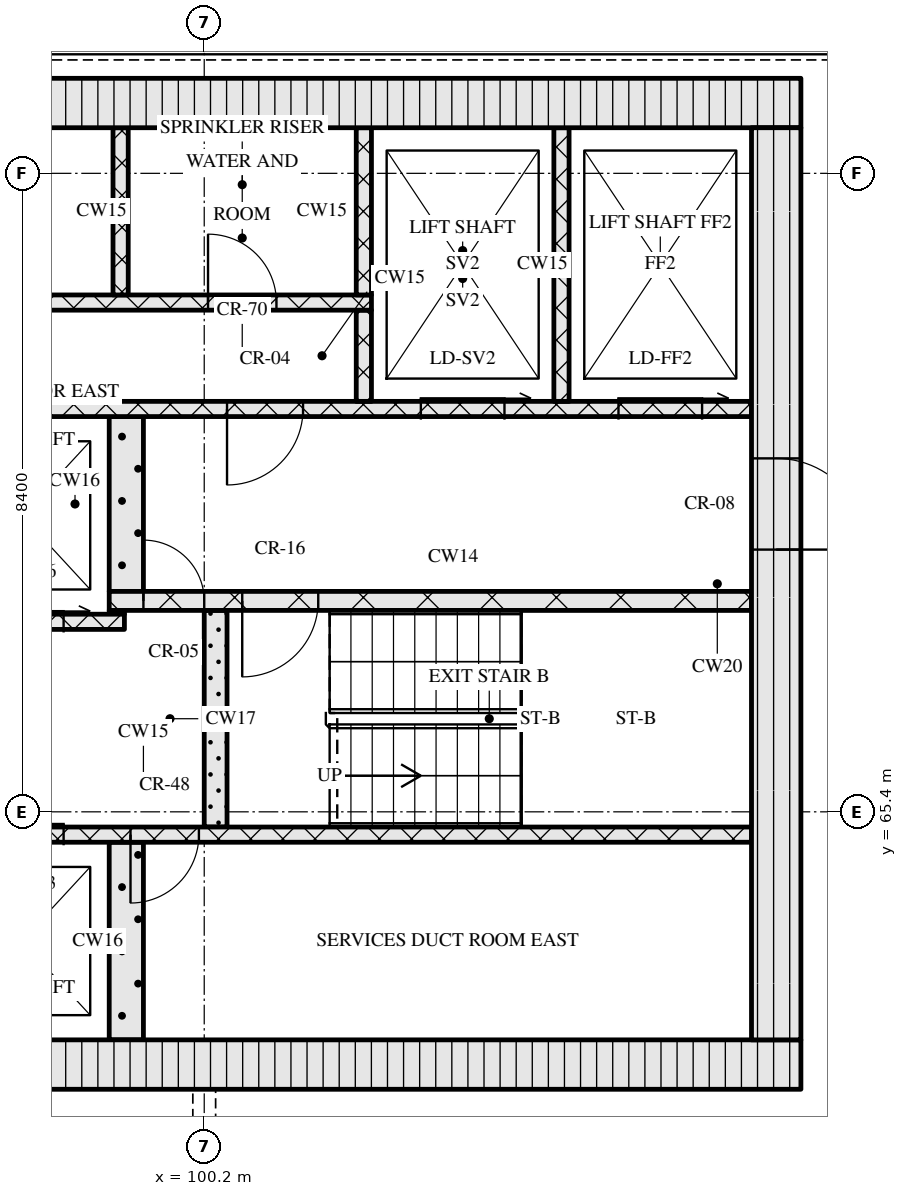
"""IFC4 building model, lengths in metres.
Left out: names, types, materials, properties, quantities, classifications, styles, units other than length and angle.
Written with IfcOpenShell. Run it as: python <this file> out.ifc"""

import sys

from ifc_helpers import new_model, si_unit, direction, frame, frame_2d, origin, place, context, subcontext, project, spatial, rectangle, extrude, element, fill, save


model = new_model("IFC4")
c1 = context("Model", 3, precision=1e-05, world=origin(), true_north=direction((0.0, 1.0)))
c2 = subcontext(c1, "Body", "Model", "MODEL_VIEW")
j1 = project(units=[si_unit("LENGTHUNIT", "METRE"), si_unit("PLANEANGLEUNIT", "RADIAN")], contexts=[c1])
p1 = place(None, origin())
s1 = spatial("IfcSite", under=j1, at=p1, CompositionType="ELEMENT")
p2 = place(p1, origin())
s2 = spatial("IfcBuilding", under=s1, at=p2, CompositionType="ELEMENT")
p3 = place(p2, frame((0.0, 0.0, 205.5)))
s3 = spatial("IfcBuildingStorey", under=s2, at=p3, CompositionType="ELEMENT", Elevation=205.5)
p4 = place(p3, frame((67.15, 62.075, 0.0), z_axis=(0.0, 0.0, 1.0), x_axis=(1.0, 0.0, 0.0)))
e1 = element("IfcWall", 1, at=p4, inside=s3, PredefinedType="SOLIDWALL", context=c2, shape_type="SweptSolid", body=[
    extrude(rectangle(XDim=40.9, YDim=0.65, at=frame_2d((20.45, 0.0))), origin(), (0.0, 0.0, 1.0), 3.32),
])
p5 = place(p4, frame((20.8, 0.0, 0.0)))
e2 = element("IfcOpeningElement", 2, at=p5, cuts=e1, PredefinedType="OPENING", context=c2, shape_type="SweptSolid", body=[
    extrude(rectangle(XDim=1.8, YDim=2.1, at=frame_2d((0.9, 1.05))), frame((0.0, 0.335, 0.0), z_axis=(0.0, -1.0, 0.0), x_axis=(1.0, 0.0, 0.0)), (0.0, 0.0, 1.0), 0.67),
])
p6 = place(p3, frame((67.15, 74.725, 0.0), z_axis=(0.0, 0.0, 1.0), x_axis=(1.0, 0.0, 0.0)))
e3 = element("IfcWall", 3, at=p6, inside=s3, PredefinedType="SOLIDWALL", context=c2, shape_type="SweptSolid", body=[
    extrude(rectangle(XDim=40.9, YDim=0.65, at=frame_2d((20.45, 0.0))), origin(), (0.0, 0.0, 1.0), 3.32),
])
p7 = place(p3, frame((107.725, 62.4, 0.0), z_axis=(0.0, 0.0, 1.0), x_axis=(0.0, 1.0, 0.0)))
e4 = element("IfcWall", 4, at=p7, inside=s3, PredefinedType="SOLIDWALL", context=c2, shape_type="SweptSolid", body=[
    extrude(rectangle(XDim=12.0, YDim=0.65, at=frame_2d((6.0, 0.0))), origin(), (0.0, 0.0, 1.0), 3.32),
])
p8 = place(p7, frame((6.45, 0.0, 0.0)))
e5 = element("IfcOpeningElement", 5, at=p8, cuts=e4, PredefinedType="OPENING", context=c2, shape_type="SweptSolid", body=[
    extrude(rectangle(XDim=1.2, YDim=2.1, at=frame_2d((0.6, 1.05))), frame((0.0, 0.335, 0.0), z_axis=(0.0, -1.0, 0.0), x_axis=(1.0, 0.0, 0.0)), (0.0, 0.0, 1.0), 0.67),
])
p9 = place(p3, frame((99.175, 62.4, 0.0), z_axis=(0.0, 0.0, 1.0), x_axis=(0.0, 1.0, 0.0)))
e6 = element("IfcWall", 6, at=p9, inside=s3, PredefinedType="SOLIDWALL", context=c2, shape_type="SweptSolid", body=[
    extrude(rectangle(XDim=2.6, YDim=0.45, at=frame_2d((1.3, 0.0))), origin(), (0.0, 0.0, 1.0), 3.32),
])
p10 = place(p3, frame((91.4, 65.1, 0.0), z_axis=(0.0, 0.0, 1.0), x_axis=(1.0, 0.0, 0.0)))
e7 = element("IfcWall", 7, at=p10, inside=s3, PredefinedType="SOLIDWALL", context=c2, shape_type="SweptSolid", body=[
    extrude(rectangle(XDim=16.0, YDim=0.2, at=frame_2d((8.0, 0.0))), origin(), (0.0, 0.0, 1.0), 3.32),
])
p11 = place(p10, frame((0.85, 0.0, 0.0)))
e8 = element("IfcOpeningElement", 8, at=p11, cuts=e7, PredefinedType="OPENING", context=c2, shape_type="SweptSolid", body=[
    extrude(rectangle(XDim=1.1, YDim=2.1, at=frame_2d((0.55, 1.05))), frame((0.0, 0.11, 0.0), z_axis=(0.0, -1.0, 0.0), x_axis=(1.0, 0.0, 0.0)), (0.0, 0.0, 1.0), 0.22),
])
p12 = place(p10, frame((3.35, 0.0, 0.0)))
e9 = element("IfcOpeningElement", 9, at=p12, cuts=e7, PredefinedType="OPENING", context=c2, shape_type="SweptSolid", body=[
    extrude(rectangle(XDim=1.1, YDim=2.1, at=frame_2d((0.55, 1.05))), frame((0.0, 0.11, 0.0), z_axis=(0.0, -1.0, 0.0), x_axis=(1.0, 0.0, 0.0)), (0.0, 0.0, 1.0), 0.22),
])
p13 = place(p10, frame((5.85, 0.0, 0.0)))
e10 = element("IfcOpeningElement", 10, at=p13, cuts=e7, PredefinedType="OPENING", context=c2, shape_type="SweptSolid", body=[
    extrude(rectangle(XDim=1.1, YDim=2.1, at=frame_2d((0.55, 1.05))), frame((0.0, 0.11, 0.0), z_axis=(0.0, -1.0, 0.0), x_axis=(1.0, 0.0, 0.0)), (0.0, 0.0, 1.0), 0.22),
])
p14 = place(p10, frame((7.83, 0.0, 0.0)))
e11 = element("IfcOpeningElement", 11, at=p14, cuts=e7, PredefinedType="OPENING", context=c2, shape_type="SweptSolid", body=[
    extrude(rectangle(XDim=0.9, YDim=2.1, at=frame_2d((0.45, 1.05))), frame((0.0, 0.11, 0.0), z_axis=(0.0, -1.0, 0.0), x_axis=(1.0, 0.0, 0.0)), (0.0, 0.0, 1.0), 0.22),
])
p15 = place(p3, frame((100.35, 65.2, 0.0), z_axis=(0.0, 0.0, 1.0), x_axis=(0.0, 1.0, 0.0)))
e12 = element("IfcWall", 12, at=p15, inside=s3, PredefinedType="SOLIDWALL", context=c2, shape_type="SweptSolid", body=[
    extrude(rectangle(XDim=2.85, YDim=0.3, at=frame_2d((1.425, 0.0))), origin(), (0.0, 0.0, 1.0), 3.32),
])
p16 = place(p3, frame((76.05, 67.9, 0.0), z_axis=(0.0, 0.0, 1.0), x_axis=(1.0, 0.0, 0.0)))
e13 = element("IfcWall", 13, at=p16, inside=s3, PredefinedType="SOLIDWALL", context=c2, shape_type="SweptSolid", body=[
    extrude(rectangle(XDim=23.1, YDim=0.2, at=frame_2d((11.55, 0.0))), origin(), (0.0, 0.0, 1.0), 3.32),
])
p17 = place(p16, frame((1.4, 0.0, 0.0)))
e14 = element("IfcOpeningElement", 14, at=p17, cuts=e13, PredefinedType="OPENING", context=c2, shape_type="SweptSolid", body=[
    extrude(rectangle(XDim=0.9, YDim=2.1, at=frame_2d((0.45, 1.05))), frame((0.0, 0.11, 0.0), z_axis=(0.0, -1.0, 0.0), x_axis=(1.0, 0.0, 0.0)), (0.0, 0.0, 1.0), 0.22),
])
p18 = place(p16, frame((5.11, 0.0, 0.0)))
e15 = element("IfcOpeningElement", 15, at=p18, cuts=e13, PredefinedType="OPENING", context=c2, shape_type="SweptSolid", body=[
    extrude(rectangle(XDim=0.9, YDim=2.1, at=frame_2d((0.45, 1.05))), frame((0.0, 0.11, 0.0), z_axis=(0.0, -1.0, 0.0), x_axis=(1.0, 0.0, 0.0)), (0.0, 0.0, 1.0), 0.22),
])
p19 = place(p16, frame((8.45, 0.0, 0.0)))
e16 = element("IfcOpeningElement", 16, at=p19, cuts=e13, PredefinedType="OPENING", context=c2, shape_type="SweptSolid", body=[
    extrude(rectangle(XDim=0.9, YDim=2.1, at=frame_2d((0.45, 1.05))), frame((0.0, 0.11, 0.0), z_axis=(0.0, -1.0, 0.0), x_axis=(1.0, 0.0, 0.0)), (0.0, 0.0, 1.0), 0.22),
])
p20 = place(p16, frame((10.91, 0.0, 0.0)))
e17 = element("IfcOpeningElement", 17, at=p20, cuts=e13, PredefinedType="OPENING", context=c2, shape_type="SweptSolid", body=[
    extrude(rectangle(XDim=0.9, YDim=2.1, at=frame_2d((0.45, 1.05))), frame((0.0, 0.11, 0.0), z_axis=(0.0, -1.0, 0.0), x_axis=(1.0, 0.0, 0.0)), (0.0, 0.0, 1.0), 0.22),
])
p21 = place(p16, frame((13.55, 0.0, 0.0)))
e18 = element("IfcOpeningElement", 18, at=p21, cuts=e13, PredefinedType="OPENING", context=c2, shape_type="SweptSolid", body=[
    extrude(rectangle(XDim=1.0, YDim=2.1, at=frame_2d((0.5, 1.05))), frame((0.0, 0.11, 0.0), z_axis=(0.0, -1.0, 0.0), x_axis=(1.0, 0.0, 0.0)), (0.0, 0.0, 1.0), 0.22),
])
p22 = place(p16, frame((16.2, 0.0, 0.0)))
e19 = element("IfcOpeningElement", 19, at=p22, cuts=e13, PredefinedType="OPENING", context=c2, shape_type="SweptSolid", body=[
    extrude(rectangle(XDim=1.1, YDim=2.1, at=frame_2d((0.55, 1.05))), frame((0.0, 0.11, 0.0), z_axis=(0.0, -1.0, 0.0), x_axis=(1.0, 0.0, 0.0)), (0.0, 0.0, 1.0), 0.22),
])
p23 = place(p16, frame((18.7, 0.0, 0.0)))
e20 = element("IfcOpeningElement", 20, at=p23, cuts=e13, PredefinedType="OPENING", context=c2, shape_type="SweptSolid", body=[
    extrude(rectangle(XDim=1.1, YDim=2.1, at=frame_2d((0.55, 1.05))), frame((0.0, 0.11, 0.0), z_axis=(0.0, -1.0, 0.0), x_axis=(1.0, 0.0, 0.0)), (0.0, 0.0, 1.0), 0.22),
])
p24 = place(p16, frame((21.2, 0.0, 0.0)))
e21 = element("IfcOpeningElement", 21, at=p24, cuts=e13, PredefinedType="OPENING", context=c2, shape_type="SweptSolid", body=[
    extrude(rectangle(XDim=1.1, YDim=2.1, at=frame_2d((0.55, 1.05))), frame((0.0, 0.11, 0.0), z_axis=(0.0, -1.0, 0.0), x_axis=(1.0, 0.0, 0.0)), (0.0, 0.0, 1.0), 0.22),
])
p25 = place(p3, frame((98.95, 68.025, 0.0), z_axis=(0.0, 0.0, 1.0), x_axis=(1.0, 0.0, 0.0)))
e22 = element("IfcWall", 22, at=p25, inside=s3, PredefinedType="SOLIDWALL", context=c2, shape_type="SweptSolid", body=[
    extrude(rectangle(XDim=0.2, YDim=0.05, at=frame_2d((0.1, 0.0))), origin(), (0.0, 0.0, 1.0), 3.32),
])
p26 = place(p3, frame((98.95, 68.175, 0.0), z_axis=(0.0, 0.0, 1.0), x_axis=(1.0, 0.0, 0.0)))
e23 = element("IfcWall", 23, at=p26, inside=s3, PredefinedType="SOLIDWALL", context=c2, shape_type="SweptSolid", body=[
    extrude(rectangle(XDim=8.45, YDim=0.25, at=frame_2d((4.225, 0.0))), origin(), (0.0, 0.0, 1.0), 3.32),
])
p27 = place(p26, frame((0.45, 0.0, 0.0)))
e24 = element("IfcOpeningElement", 24, at=p27, cuts=e23, PredefinedType="OPENING", context=c2, shape_type="SweptSolid", body=[
    extrude(rectangle(XDim=0.8, YDim=2.1, at=frame_2d((0.4, 1.05))), frame((0.0, 0.135, 0.0), z_axis=(0.0, -1.0, 0.0), x_axis=(1.0, 0.0, 0.0)), (0.0, 0.0, 1.0), 0.27),
])
p28 = place(p26, frame((1.75, 0.0, 0.0)))
e25 = element("IfcOpeningElement", 25, at=p28, cuts=e23, PredefinedType="OPENING", context=c2, shape_type="SweptSolid", body=[
    extrude(rectangle(XDim=1.0, YDim=2.1, at=frame_2d((0.5, 1.05))), frame((0.0, 0.135, 0.0), z_axis=(0.0, -1.0, 0.0), x_axis=(1.0, 0.0, 0.0)), (0.0, 0.0, 1.0), 0.27),
])
p29 = place(p3, frame((99.175, 68.3, 0.0), z_axis=(0.0, 0.0, 1.0), x_axis=(0.0, 1.0, 0.0)))
e26 = element("IfcWall", 26, at=p29, inside=s3, PredefinedType="SOLIDWALL", context=c2, shape_type="SweptSolid", body=[
    extrude(rectangle(XDim=2.3, YDim=0.45, at=frame_2d((1.15, 0.0))), origin(), (0.0, 0.0, 1.0), 3.32),
])
p30 = place(p3, frame((67.8, 70.7, 0.0), z_axis=(0.0, 0.0, 1.0), x_axis=(1.0, 0.0, 0.0)))
e27 = element("IfcWall", 27, at=p30, inside=s3, PredefinedType="SOLIDWALL", context=c2, shape_type="SweptSolid", body=[
    extrude(rectangle(XDim=39.6, YDim=0.2, at=frame_2d((19.8, 0.0))), origin(), (0.0, 0.0, 1.0), 3.32),
])
p31 = place(p30, frame((0.65, 0.0, 0.0)))
e28 = element("IfcOpeningElement", 28, at=p31, cuts=e27, PredefinedType="OPENING", context=c2, shape_type="SweptSolid", body=[
    extrude(rectangle(XDim=1.1, YDim=2.1, at=frame_2d((0.55, 1.05))), frame((0.0, 0.11, 0.0), z_axis=(0.0, -1.0, 0.0), x_axis=(1.0, 0.0, 0.0)), (0.0, 0.0, 1.0), 0.22),
])
p32 = place(p30, frame((3.25, 0.0, 0.0)))
e29 = element("IfcOpeningElement", 29, at=p32, cuts=e27, PredefinedType="OPENING", context=c2, shape_type="SweptSolid", body=[
    extrude(rectangle(XDim=1.1, YDim=2.1, at=frame_2d((0.55, 1.05))), frame((0.0, 0.11, 0.0), z_axis=(0.0, -1.0, 0.0), x_axis=(1.0, 0.0, 0.0)), (0.0, 0.0, 1.0), 0.22),
])
p33 = place(p30, frame((5.9, 0.0, 0.0)))
e30 = element("IfcOpeningElement", 30, at=p33, cuts=e27, PredefinedType="OPENING", context=c2, shape_type="SweptSolid", body=[
    extrude(rectangle(XDim=1.0, YDim=2.1, at=frame_2d((0.5, 1.05))), frame((0.0, 0.11, 0.0), z_axis=(0.0, -1.0, 0.0), x_axis=(1.0, 0.0, 0.0)), (0.0, 0.0, 1.0), 0.22),
])
p34 = place(p30, frame((21.7, 0.0, 0.0)))
e31 = element("IfcOpeningElement", 31, at=p34, cuts=e27, PredefinedType="OPENING", context=c2, shape_type="SweptSolid", body=[
    extrude(rectangle(XDim=1.0, YDim=2.1, at=frame_2d((0.5, 1.05))), frame((0.0, 0.11, 0.0), z_axis=(0.0, -1.0, 0.0), x_axis=(1.0, 0.0, 0.0)), (0.0, 0.0, 1.0), 0.22),
])
p35 = place(p30, frame((32.7, 0.0, 0.0)))
e32 = element("IfcOpeningElement", 32, at=p35, cuts=e27, PredefinedType="OPENING", context=c2, shape_type="SweptSolid", body=[
    extrude(rectangle(XDim=1.0, YDim=2.1, at=frame_2d((0.5, 1.05))), frame((0.0, 0.11, 0.0), z_axis=(0.0, -1.0, 0.0), x_axis=(1.0, 0.0, 0.0)), (0.0, 0.0, 1.0), 0.22),
])
p36 = place(p30, frame((35.25, 0.0, 0.0)))
e33 = element("IfcOpeningElement", 33, at=p36, cuts=e27, PredefinedType="OPENING", context=c2, shape_type="SweptSolid", body=[
    extrude(rectangle(XDim=1.1, YDim=2.1, at=frame_2d((0.55, 1.05))), frame((0.0, 0.11, 0.0), z_axis=(0.0, -1.0, 0.0), x_axis=(1.0, 0.0, 0.0)), (0.0, 0.0, 1.0), 0.22),
])
p37 = place(p30, frame((37.85, 0.0, 0.0)))
e34 = element("IfcOpeningElement", 34, at=p37, cuts=e27, PredefinedType="OPENING", context=c2, shape_type="SweptSolid", body=[
    extrude(rectangle(XDim=1.1, YDim=2.1, at=frame_2d((0.55, 1.05))), frame((0.0, 0.11, 0.0), z_axis=(0.0, -1.0, 0.0), x_axis=(1.0, 0.0, 0.0)), (0.0, 0.0, 1.0), 0.22),
])
p38 = place(p3, frame((102.3, 70.8, 0.0), z_axis=(0.0, 0.0, 1.0), x_axis=(0.0, 1.0, 0.0)))
e35 = element("IfcWall", 35, at=p38, inside=s3, PredefinedType="SOLIDWALL", context=c2, shape_type="SweptSolid", body=[
    extrude(rectangle(XDim=1.2, YDim=0.2, at=frame_2d((0.6, 0.0))), origin(), (0.0, 0.0, 1.0), 3.32),
])
p39 = place(p3, frame((104.9, 70.8, 0.0), z_axis=(0.0, 0.0, 1.0), x_axis=(0.0, 1.0, 0.0)))
e36 = element("IfcWall", 36, at=p39, inside=s3, PredefinedType="SOLIDWALL", context=c2, shape_type="SweptSolid", body=[
    extrude(rectangle(XDim=3.6, YDim=0.2, at=frame_2d((1.8, 0.0))), origin(), (0.0, 0.0, 1.0), 3.32),
])
p40 = place(p3, frame((93.28, 72.1, 0.0), z_axis=(0.0, 0.0, 1.0), x_axis=(1.0, 0.0, 0.0)))
e37 = element("IfcWall", 37, at=p40, inside=s3, PredefinedType="SOLIDWALL", context=c2, shape_type="SweptSolid", body=[
    extrude(rectangle(XDim=9.12, YDim=0.2, at=frame_2d((4.56, 0.0))), origin(), (0.0, 0.0, 1.0), 3.32),
])
p41 = place(p40, frame((0.87, 0.0, 0.0)))
e38 = element("IfcOpeningElement", 38, at=p41, cuts=e37, PredefinedType="OPENING", context=c2, shape_type="SweptSolid", body=[
    extrude(rectangle(XDim=0.9, YDim=2.1, at=frame_2d((0.45, 1.05))), frame((0.0, 0.11, 0.0), z_axis=(0.0, -1.0, 0.0), x_axis=(1.0, 0.0, 0.0)), (0.0, 0.0, 1.0), 0.22),
])
p42 = place(p40, frame((3.73, 0.0, 0.0)))
e39 = element("IfcOpeningElement", 39, at=p42, cuts=e37, PredefinedType="OPENING", context=c2, shape_type="SweptSolid", body=[
    extrude(rectangle(XDim=0.9, YDim=2.1, at=frame_2d((0.45, 1.05))), frame((0.0, 0.11, 0.0), z_axis=(0.0, -1.0, 0.0), x_axis=(1.0, 0.0, 0.0)), (0.0, 0.0, 1.0), 0.22),
])
p43 = place(p40, frame((6.97, 0.0, 0.0)))
e40 = element("IfcOpeningElement", 40, at=p43, cuts=e37, PredefinedType="OPENING", context=c2, shape_type="SweptSolid", body=[
    extrude(rectangle(XDim=0.9, YDim=2.1, at=frame_2d((0.45, 1.05))), frame((0.0, 0.11, 0.0), z_axis=(0.0, -1.0, 0.0), x_axis=(1.0, 0.0, 0.0)), (0.0, 0.0, 1.0), 0.22),
])
for number, where, z_axis, x_axis in (
    (41, (99.1, 72.2, 0.0), (0.0, 0.0, 1.0), (0.0, 1.0, 0.0)),
    (42, (102.3, 72.2, 0.0), (0.0, 0.0, 1.0), (0.0, 1.0, 0.0)),
):
    element("IfcWall", number, at=place(p3, frame(where, z_axis=z_axis, x_axis=x_axis)), inside=s3, PredefinedType="SOLIDWALL", context=c2, shape_type="SweptSolid", body=[
        extrude(rectangle(XDim=2.2, YDim=0.2, at=frame_2d((1.1, 0.0))), origin(), (0.0, 0.0, 1.0), 3.32),
    ])
p44 = place(p13, origin())
e43 = element("IfcDoor", 43, at=p44, inside=s3, OperationType="SLIDING_TO_LEFT", PredefinedType="DOOR", context=c2, shape_type="SweptSolid", body=[
    extrude(rectangle(XDim=1.1, YDim=2.1, at=frame_2d((0.55, 1.05))), frame((0.0, 0.025, 0.0), z_axis=(0.0, -1.0, 0.0), x_axis=(1.0, 0.0, 0.0)), (0.0, 0.0, 1.0), 0.05),
])
fill(e10, e43)
p45 = place(p14, origin())
e44 = element("IfcDoor", 44, at=p45, inside=s3, OperationType="SINGLE_SWING_RIGHT", PredefinedType="DOOR", context=c2, shape_type="SweptSolid", body=[
    extrude(rectangle(XDim=0.9, YDim=2.1, at=frame_2d((0.45, 1.05))), frame((0.0, 0.025, 0.0), z_axis=(0.0, -1.0, 0.0), x_axis=(1.0, 0.0, 0.0)), (0.0, 0.0, 1.0), 0.05),
])
fill(e11, e44)
p46 = place(p24, origin())
e45 = element("IfcDoor", 45, at=p46, inside=s3, OperationType="SLIDING_TO_RIGHT", PredefinedType="DOOR", context=c2, shape_type="SweptSolid", body=[
    extrude(rectangle(XDim=1.1, YDim=2.1, at=frame_2d((0.55, 1.05))), frame((0.0, 0.025, 0.0), z_axis=(0.0, -1.0, 0.0), x_axis=(1.0, 0.0, 0.0)), (0.0, 0.0, 1.0), 0.05),
])
fill(e21, e45)
p47 = place(p27, origin())
e46 = element("IfcDoor", 46, at=p47, inside=s3, OperationType="SINGLE_SWING_LEFT", PredefinedType="DOOR", context=c2, shape_type="SweptSolid", body=[
    extrude(rectangle(XDim=0.8, YDim=2.1, at=frame_2d((0.4, 1.05))), frame((0.0, 0.025, 0.0), z_axis=(0.0, -1.0, 0.0), x_axis=(1.0, 0.0, 0.0)), (0.0, 0.0, 1.0), 0.05),
])
fill(e24, e46)
p48 = place(p28, origin())
e47 = element("IfcDoor", 47, at=p48, inside=s3, OperationType="SINGLE_SWING_RIGHT", PredefinedType="DOOR", context=c2, shape_type="SweptSolid", body=[
    extrude(rectangle(XDim=1.0, YDim=2.1, at=frame_2d((0.5, 1.05))), frame((0.0, 0.025, 0.0), z_axis=(0.0, -1.0, 0.0), x_axis=(1.0, 0.0, 0.0)), (0.0, 0.0, 1.0), 0.05),
])
fill(e25, e47)
p49 = place(p8, origin())
e48 = element("IfcDoor", 48, at=p49, inside=s3, OperationType="SINGLE_SWING_RIGHT", PredefinedType="DOOR", context=c2, shape_type="SweptSolid", body=[
    extrude(rectangle(XDim=1.2, YDim=2.1, at=frame_2d((0.6, 1.05))), frame((0.0, 0.025, 0.0), z_axis=(0.0, -1.0, 0.0), x_axis=(1.0, 0.0, 0.0)), (0.0, 0.0, 1.0), 0.05),
])
fill(e5, e48)
p50 = place(p35, origin())
e49 = element("IfcDoor", 49, at=p50, inside=s3, OperationType="SINGLE_SWING_RIGHT", PredefinedType="DOOR", context=c2, shape_type="SweptSolid", body=[
    extrude(rectangle(XDim=1.0, YDim=2.1, at=frame_2d((0.5, 1.05))), frame((0.0, 0.025, 0.0), z_axis=(0.0, -1.0, 0.0), x_axis=(1.0, 0.0, 0.0)), (0.0, 0.0, 1.0), 0.05),
])
fill(e32, e49)
p51 = place(p36, origin())
e50 = element("IfcDoor", 50, at=p51, inside=s3, OperationType="SLIDING_TO_RIGHT", PredefinedType="DOOR", context=c2, shape_type="SweptSolid", body=[
    extrude(rectangle(XDim=1.1, YDim=2.1, at=frame_2d((0.55, 1.05))), frame((0.0, 0.025, 0.0), z_axis=(0.0, -1.0, 0.0), x_axis=(1.0, 0.0, 0.0)), (0.0, 0.0, 1.0), 0.05),
])
fill(e33, e50)
p52 = place(p37, origin())
e51 = element("IfcDoor", 51, at=p52, inside=s3, OperationType="SLIDING_TO_RIGHT", PredefinedType="DOOR", context=c2, shape_type="SweptSolid", body=[
    extrude(rectangle(XDim=1.1, YDim=2.1, at=frame_2d((0.55, 1.05))), frame((0.0, 0.025, 0.0), z_axis=(0.0, -1.0, 0.0), x_axis=(1.0, 0.0, 0.0)), (0.0, 0.0, 1.0), 0.05),
])
fill(e34, e51)
p53 = place(p43, origin())
e52 = element("IfcDoor", 52, at=p53, inside=s3, OperationType="SINGLE_SWING_LEFT", PredefinedType="DOOR", context=c2, shape_type="SweptSolid", body=[
    extrude(rectangle(XDim=0.9, YDim=2.1, at=frame_2d((0.45, 1.05))), frame((0.0, 0.025, 0.0), z_axis=(0.0, -1.0, 0.0), x_axis=(1.0, 0.0, 0.0)), (0.0, 0.0, 1.0), 0.05),
])
fill(e40, e52)
save(model, sys.argv[1])
